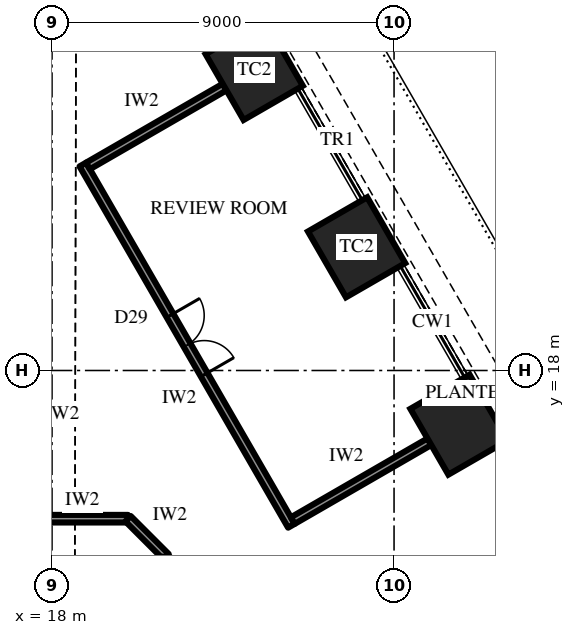
"""IFC4 building model, lengths in metres.
Left out: names, types, materials, properties, quantities, classifications, styles, units other than length and angle.
Written with IfcOpenShell. Run it as: python <this file> out.ifc"""

import sys

from ifc_helpers import new_model, si_unit, direction, frame, frame_2d, origin, origin_2d, place, context, subcontext, project, spatial, rectangle, extrude, element, fill, save


model = new_model("IFC4")
c1 = context("Model", 3, precision=1e-05, world=origin(), true_north=direction((0.0, 1.0)))
c2 = subcontext(c1, "Body", "Model", "MODEL_VIEW")
j1 = project(units=[si_unit("LENGTHUNIT", "METRE"), si_unit("PLANEANGLEUNIT", "RADIAN")], contexts=[c1])
p1 = place(None, origin())
s1 = spatial("IfcSite", under=j1, at=p1, CompositionType="ELEMENT")
p2 = place(p1, origin())
s2 = spatial("IfcBuilding", under=s1, at=p2, CompositionType="ELEMENT")
p3 = place(p2, frame((0.0, 0.0, 61.3)))
s3 = spatial("IfcBuildingStorey", under=s2, at=p3, CompositionType="ELEMENT", Elevation=61.3)
for number, where, z_axis, x_axis in (
    (1, (28.709, 16.575, 0.0), (0.0, 0.0, 1.0), (-0.5, 0.866, 0.0)),
    (2, (26.014, 21.242, 0.0), (0.0, 0.0, 1.0), (-0.5, 0.866, 0.0)),
    (3, (23.32, 25.908, 0.0), (0.0, 0.0, 1.0), (-0.5, 0.866, 0.0)),
):
    element("IfcColumn", number, at=place(p3, frame(where, z_axis=z_axis, x_axis=x_axis)), inside=s3, PredefinedType="COLUMN", context=c2, shape_type="SweptSolid", body=[
        extrude(rectangle(XDim=2.0, YDim=1.8, at=origin_2d()), origin(), (0.0, 0.0, 1.0), 4.2),
    ])
p4 = place(p3, frame((24.299, 13.913, 0.0), z_axis=(0.0, 0.0, 1.0), x_axis=(-0.500009305389, 0.866020031249, 0.0)))
e4 = element("IfcWall", 4, at=p4, inside=s3, PredefinedType="PARTITIONING", context=c2, shape_type="SweptSolid", body=[
    extrude(rectangle(XDim=10.977, YDim=0.2, at=frame_2d((5.489, 0.0))), origin(), (0.0, 0.0, 1.0), 4.0),
])
p5 = place(p4, frame((4.589, 0.0, 0.0)))
e5 = element("IfcOpeningElement", 5, at=p5, cuts=e4, PredefinedType="OPENING", context=c2, shape_type="SweptSolid", body=[
    extrude(rectangle(XDim=1.8, YDim=2.4, at=frame_2d((0.9, 1.2))), frame((0.0, 0.11, 0.0), z_axis=(0.0, -1.0, 0.0), x_axis=(1.0, 0.0, 0.0)), (0.0, 0.0, 1.0), 0.22),
])
p6 = place(p3, frame((24.335, 14.05, 0.0), z_axis=(0.0, 0.0, 1.0), x_axis=(0.86602981871, 0.499992353047, 0.0)))
e6 = element("IfcWall", 6, at=p6, inside=s3, PredefinedType="PARTITIONING", context=c2, shape_type="SweptSolid", body=[
    extrude(rectangle(XDim=4.15, YDim=0.2, at=frame_2d((2.075, 0.0))), origin(), (0.0, 0.0, 1.0), 4.0),
])
p7 = place(p3, frame((18.947, 23.383, 0.0), z_axis=(0.0, 0.0, 1.0), x_axis=(0.86602981871, 0.499992353047, 0.0)))
e7 = element("IfcWall", 7, at=p7, inside=s3, PredefinedType="PARTITIONING", context=c2, shape_type="SweptSolid", body=[
    extrude(rectangle(XDim=4.15, YDim=0.2, at=frame_2d((2.075, 0.0))), origin(), (0.0, 0.0, 1.0), 2.992),
])
p8 = place(p3, frame((17.6, 14.1, 0.0), z_axis=(0.0, 0.0, 1.0), x_axis=(1.0, 0.0, 0.0)))
e8 = element("IfcWall", 8, at=p8, inside=s3, PredefinedType="PARTITIONING", context=c2, shape_type="SweptSolid", body=[
    extrude(rectangle(XDim=2.4, YDim=0.2, at=frame_2d((1.2, 0.0))), origin(), (0.0, 0.0, 1.0), 4.0),
])
p9 = place(p3, frame((20.0, 14.1, 0.0), z_axis=(0.0, 0.0, 1.0), x_axis=(0.707106781187, -0.707106781187, 0.0)))
e9 = element("IfcWall", 9, at=p9, inside=s3, PredefinedType="PARTITIONING", context=c2, shape_type="SweptSolid", body=[
    extrude(rectangle(XDim=1.414, YDim=0.2, at=frame_2d((0.707, 0.0))), origin(), (0.0, 0.0, 1.0), 4.0),
])
p10 = place(p5, frame((1.8, 0.0, 0.0), z_axis=(0.0, 0.0, 1.0), x_axis=(-1.0, 0.0, 0.0)))
e10 = element("IfcDoor", 10, at=p10, inside=s3, OperationType="DOUBLE_DOOR_SINGLE_SWING", PredefinedType="DOOR", context=c2, shape_type="SweptSolid", body=[
    extrude(rectangle(XDim=1.8, YDim=2.4, at=frame_2d((0.9, 1.2))), frame((0.0, 0.025, 0.0), z_axis=(0.0, -1.0, 0.0), x_axis=(1.0, 0.0, 0.0)), (0.0, 0.0, 1.0), 0.05),
])
fill(e5, e10)
save(model, sys.argv[1])
